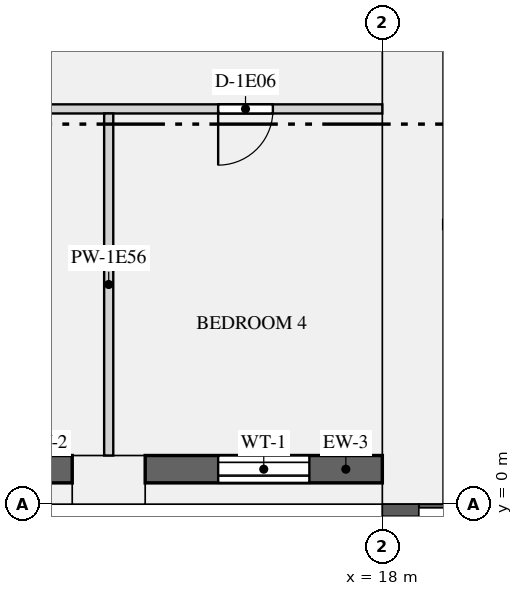
"""IFC4 building model, lengths in metres.
Left out: names, types, materials, properties, quantities, classifications, styles, units other than length and angle.
Written with IfcOpenShell. Run it as: python <this file> out.ifc"""

import sys

from ifc_helpers import new_model, si_unit, direction, frame, frame_2d, origin, origin_2d, place, context, subcontext, project, spatial, rectangle, extrude, element, fill, save


model = new_model("IFC4")
c1 = context("Model", 3, precision=1e-05, world=origin(), true_north=direction((0.0, 1.0)))
c2 = subcontext(c1, "Body", "Model", "MODEL_VIEW")
j1 = project(units=[si_unit("LENGTHUNIT", "METRE"), si_unit("PLANEANGLEUNIT", "RADIAN")], contexts=[c1])
p1 = place(None, origin())
s1 = spatial("IfcSite", under=j1, at=p1, CompositionType="ELEMENT")
p2 = place(p1, origin())
s2 = spatial("IfcBuilding", under=s1, at=p2, CompositionType="ELEMENT")
p3 = place(p2, frame((0.0, 0.0, 54.15)))
s3 = spatial("IfcBuildingStorey", under=s2, at=p3, CompositionType="ELEMENT", Elevation=54.15)
p4 = place(p3, frame((13.5, 0.4, 0.0), z_axis=(0.0, 0.0, 1.0), x_axis=(1.0, 0.0, 0.0)))
e1 = element("IfcColumn", 1, at=p4, inside=s3, PredefinedType="USERDEFINED", context=c2, shape_type="SweptSolid", body=[
    extrude(rectangle(XDim=1.2, YDim=0.8, at=origin_2d()), origin(), (0.0, 0.0, 1.0), 3.15),
])
p5 = place(p3, frame((18.5, 0.0, 0.0), z_axis=(0.0, 0.0, 1.0), x_axis=(0.0, 1.0, 0.0)))
e2 = element("IfcWall", 2, at=p5, inside=s3, PredefinedType="SHEAR", context=c2, shape_type="SweptSolid", body=[
    extrude(rectangle(XDim=12.5, YDim=1.0, at=frame_2d((6.25, 0.0))), origin(), (0.0, 0.0, 1.0), 3.15),
])
p6 = place(p3, frame((9.6, 0.575, 0.9), z_axis=(0.0, 0.0, 1.0), x_axis=(1.0, 0.0, 0.0)))
e3 = element("IfcWall", 3, at=p6, inside=s3, PredefinedType="SOLIDWALL", context=c2, shape_type="SweptSolid", body=[
    extrude(rectangle(XDim=3.3, YDim=0.45, at=frame_2d((1.65, 0.0))), origin(), (0.0, 0.0, 1.0), 1.93),
])
p7 = place(p6, frame((0.9, 0.0, 0.15)))
e4 = element("IfcOpeningElement", 4, at=p7, cuts=e3, PredefinedType="OPENING", context=c2, shape_type="SweptSolid", body=[
    extrude(rectangle(XDim=1.5, YDim=1.5, at=frame_2d((0.75, 0.75))), frame((0.0, 0.235, 0.0), z_axis=(0.0, -1.0, 0.0), x_axis=(1.0, 0.0, 0.0)), (0.0, 0.0, 1.0), 0.47),
])
p8 = place(p3, frame((14.1, 0.575, 0.9), z_axis=(0.0, 0.0, 1.0), x_axis=(1.0, 0.0, 0.0)))
e5 = element("IfcWall", 5, at=p8, inside=s3, PredefinedType="SOLIDWALL", context=c2, shape_type="SweptSolid", body=[
    extrude(rectangle(XDim=3.9, YDim=0.45, at=frame_2d((1.95, 0.0))), origin(), (0.0, 0.0, 1.0), 1.93),
])
p9 = place(p8, frame((1.2, 0.0, 0.15)))
e6 = element("IfcOpeningElement", 6, at=p9, cuts=e5, PredefinedType="OPENING", context=c2, shape_type="SweptSolid", body=[
    extrude(rectangle(XDim=1.5, YDim=1.5, at=frame_2d((0.75, 0.75))), frame((0.0, 0.235, 0.0), z_axis=(0.0, -1.0, 0.0), x_axis=(1.0, 0.0, 0.0)), (0.0, 0.0, 1.0), 0.47),
])
p10 = place(p3, frame((19.0, 4.6, 0.0), z_axis=(0.0, 0.0, 1.0), x_axis=(1.0, 0.0, 0.0)))
e7 = element("IfcWall", 7, at=p10, inside=s3, PredefinedType="PARTITIONING", context=c2, shape_type="SweptSolid", body=[
    extrude(rectangle(XDim=8.3, YDim=0.15, at=frame_2d((4.15, 0.0))), origin(), (0.0, 0.0, 1.0), 2.83),
])
p11 = place(p10, frame((0.45, 0.0, 0.0)))
e8 = element("IfcOpeningElement", 8, at=p11, cuts=e7, PredefinedType="OPENING", context=c2, shape_type="SweptSolid", body=[
    extrude(rectangle(XDim=0.9, YDim=2.1, at=frame_2d((0.45, 1.05))), frame((0.0, 0.085, 0.0), z_axis=(0.0, -1.0, 0.0), x_axis=(1.0, 0.0, 0.0)), (0.0, 0.0, 1.0), 0.17),
])
p12 = place(p10, frame((3.25, 0.0, 0.0)))
e9 = element("IfcOpeningElement", 9, at=p12, cuts=e7, PredefinedType="OPENING", context=c2, shape_type="SweptSolid", body=[
    extrude(rectangle(XDim=0.9, YDim=2.1, at=frame_2d((0.45, 1.05))), frame((0.0, 0.085, 0.0), z_axis=(0.0, -1.0, 0.0), x_axis=(1.0, 0.0, 0.0)), (0.0, 0.0, 1.0), 0.17),
])
p13 = place(p10, frame((6.05, 0.0, 0.0)))
e10 = element("IfcOpeningElement", 10, at=p13, cuts=e7, PredefinedType="OPENING", context=c2, shape_type="SweptSolid", body=[
    extrude(rectangle(XDim=0.9, YDim=2.1, at=frame_2d((0.45, 1.05))), frame((0.0, 0.085, 0.0), z_axis=(0.0, -1.0, 0.0), x_axis=(1.0, 0.0, 0.0)), (0.0, 0.0, 1.0), 0.17),
])
p14 = place(p3, frame((4.575, 6.5, 0.0), z_axis=(0.0, 0.0, 1.0), x_axis=(1.0, 0.0, 0.0)))
e11 = element("IfcWall", 11, at=p14, inside=s3, PredefinedType="PARTITIONING", context=c2, shape_type="SweptSolid", body=[
    extrude(rectangle(XDim=13.425, YDim=0.15, at=frame_2d((6.712, 0.0))), origin(), (0.0, 0.0, 1.0), 2.83),
])
p15 = place(p14, frame((1.725, 0.0, 0.0)))
e12 = element("IfcOpeningElement", 12, at=p15, cuts=e11, PredefinedType="OPENING", context=c2, shape_type="SweptSolid", body=[
    extrude(rectangle(XDim=0.9, YDim=2.1, at=frame_2d((0.45, 1.05))), frame((0.0, 0.085, 0.0), z_axis=(0.0, -1.0, 0.0), x_axis=(1.0, 0.0, 0.0)), (0.0, 0.0, 1.0), 0.17),
])
p16 = place(p14, frame((6.225, 0.0, 0.0)))
e13 = element("IfcOpeningElement", 13, at=p16, cuts=e11, PredefinedType="OPENING", context=c2, shape_type="SweptSolid", body=[
    extrude(rectangle(XDim=0.9, YDim=2.1, at=frame_2d((0.45, 1.05))), frame((0.0, 0.085, 0.0), z_axis=(0.0, -1.0, 0.0), x_axis=(1.0, 0.0, 0.0)), (0.0, 0.0, 1.0), 0.17),
])
p17 = place(p14, frame((10.725, 0.0, 0.0)))
e14 = element("IfcOpeningElement", 14, at=p17, cuts=e11, PredefinedType="OPENING", context=c2, shape_type="SweptSolid", body=[
    extrude(rectangle(XDim=0.9, YDim=2.1, at=frame_2d((0.45, 1.05))), frame((0.0, 0.085, 0.0), z_axis=(0.0, -1.0, 0.0), x_axis=(1.0, 0.0, 0.0)), (0.0, 0.0, 1.0), 0.17),
])
p18 = place(p3, frame((13.5, 0.8, 0.0), z_axis=(0.0, 0.0, 1.0), x_axis=(0.0, 1.0, 0.0)))
e15 = element("IfcWall", 15, at=p18, inside=s3, PredefinedType="PARTITIONING", context=c2, shape_type="SweptSolid", body=[
    extrude(rectangle(XDim=5.625, YDim=0.15, at=frame_2d((2.812, 0.0))), origin(), (0.0, 0.0, 1.0), 2.83),
])
p19 = place(p9, origin())
e16 = element("IfcWindow", 16, at=p19, inside=s3, PartitioningType="SINGLE_PANEL", PredefinedType="WINDOW", context=c2, shape_type="SweptSolid", body=[
    extrude(rectangle(XDim=1.5, YDim=1.5, at=frame_2d((0.75, 0.75))), frame((0.0, -0.065, 0.0), z_axis=(0.0, -1.0, 0.0), x_axis=(1.0, 0.0, 0.0)), (0.0, 0.0, 1.0), 0.06),
])
fill(e6, e16)
p20 = place(p17, frame((0.9, 0.0, 0.0), z_axis=(0.0, 0.0, 1.0), x_axis=(-1.0, 0.0, 0.0)))
e17 = element("IfcDoor", 17, at=p20, inside=s3, OperationType="SINGLE_SWING_RIGHT", PredefinedType="DOOR", context=c2, shape_type="SweptSolid", body=[
    extrude(rectangle(XDim=0.9, YDim=2.1, at=frame_2d((0.45, 1.05))), frame((0.0, 0.025, 0.0), z_axis=(0.0, -1.0, 0.0), x_axis=(1.0, 0.0, 0.0)), (0.0, 0.0, 1.0), 0.05),
])
fill(e14, e17)
save(model, sys.argv[1])
